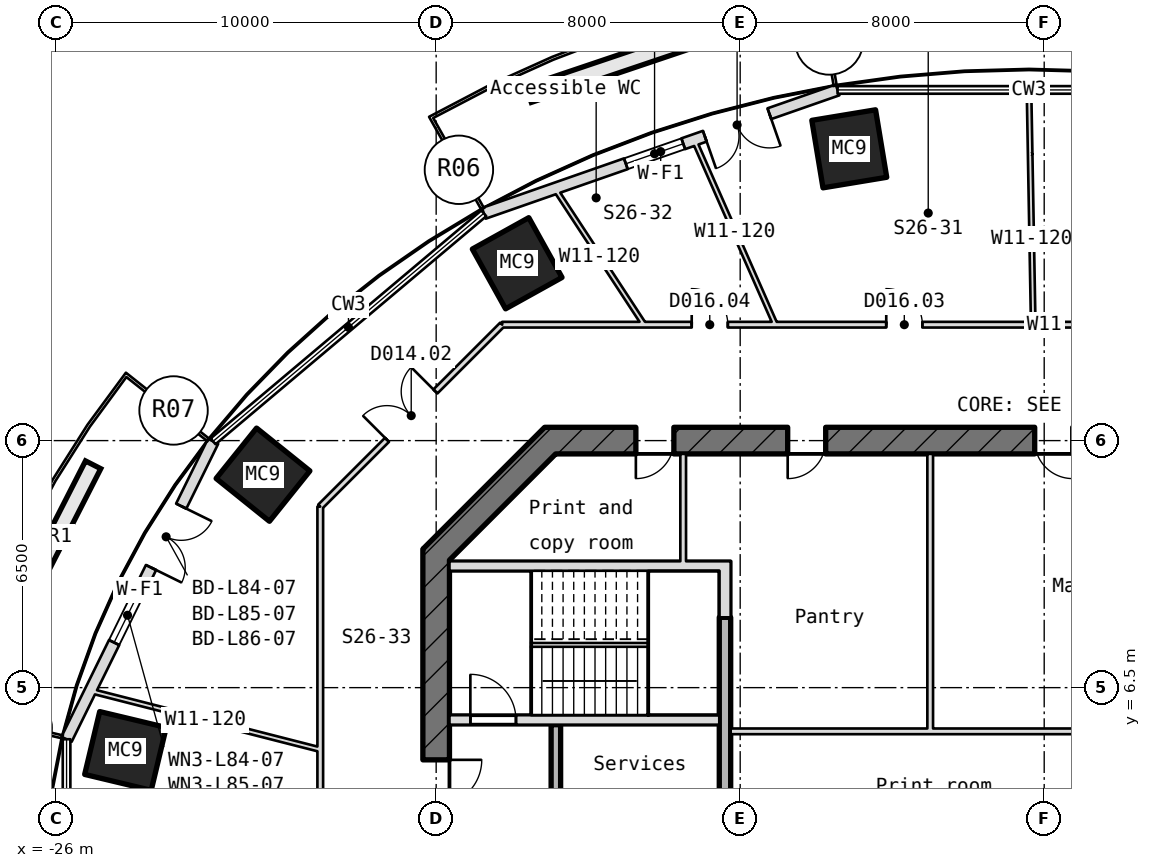
"""IFC4 building model, lengths in metres.
Left out: names, types, materials, properties, quantities, classifications, styles, units other than length and angle.
Written with IfcOpenShell. Run it as: python <this file> out.ifc"""

import sys

from ifc_helpers import new_model, si_unit, direction, frame, frame_2d, origin, origin_2d, place, context, subcontext, project, spatial, rectangle, hollow_rectangle, extrude, element, fill, save


model = new_model("IFC4")
c1 = context("Model", 3, precision=1e-05, world=origin(), true_north=direction((0.0, 1.0)))
c2 = subcontext(c1, "Body", "Model", "MODEL_VIEW")
j1 = project(units=[si_unit("LENGTHUNIT", "METRE"), si_unit("PLANEANGLEUNIT", "RADIAN")], contexts=[c1])
p1 = place(None, origin())
s1 = spatial("IfcSite", under=j1, at=p1, CompositionType="ELEMENT")
p2 = place(p1, origin())
s2 = spatial("IfcBuilding", under=s1, at=p2, CompositionType="ELEMENT")
p3 = place(p2, frame((0.0, 0.0, 371.65)))
s3 = spatial("IfcBuildingStorey", under=s2, at=p3, CompositionType="ELEMENT", Elevation=371.65)
for number, where, z_axis, x_axis in (
    (1, (-5.129, 20.677, -0.18), (0.0, 0.0, 1.0), (0.987, 0.163, 0.0)),
    (2, (-13.868, 17.667, -0.18), (0.0, 0.0, 1.0), (0.874, 0.486, 0.0)),
    (3, (-20.556, 12.103, -0.18), (0.0, 0.0, 1.0), (0.626, 0.78, 0.0)),
    (4, (-24.176, 4.834, -0.18), (0.0, 0.0, 1.0), (0.233, 0.973, 0.0)),
):
    element("IfcColumn", number, at=place(p3, frame(where, z_axis=z_axis, x_axis=x_axis)), inside=s3, PredefinedType="COLUMN", context=c2, shape_type="SweptSolid", body=[
        extrude(hollow_rectangle(XDim=1.7, YDim=1.8, WallThickness=0.05, at=origin_2d()), origin(), (0.0, 0.0, 1.0), 4.15),
    ])
p4 = place(p3, frame((-5.438, 22.227, 0.0), z_axis=(0.0, 0.0, 1.0), x_axis=(-0.944201076981, -0.329369589106, 0.0)))
e5 = element("IfcWall", 5, at=p4, inside=s3, PredefinedType="SOLIDWALL", context=c2, shape_type="SweptSolid", body=[
    extrude(rectangle(XDim=9.858, YDim=0.3, at=frame_2d((4.929, 0.0))), origin(), (0.0, 0.0, 1.0), 3.97),
])
p5 = place(p4, frame((1.9, 0.0, 0.0)))
e6 = element("IfcOpeningElement", 6, at=p5, cuts=e5, PredefinedType="OPENING", context=c2, shape_type="SweptSolid", body=[
    extrude(rectangle(XDim=1.8, YDim=2.4, at=frame_2d((0.9, 1.2))), frame((0.0, 0.16, 0.0), z_axis=(0.0, -1.0, 0.0), x_axis=(1.0, 0.0, 0.0)), (0.0, 0.0, 1.0), 0.32),
])
p6 = place(p4, frame((4.3, 0.0, 0.9)))
e7 = element("IfcOpeningElement", 7, at=p6, cuts=e5, PredefinedType="OPENING", context=c2, shape_type="SweptSolid", body=[
    extrude(rectangle(XDim=1.6, YDim=1.5, at=frame_2d((0.8, 0.75))), frame((0.0, 0.16, 0.0), z_axis=(0.0, -1.0, 0.0), x_axis=(1.0, 0.0, 0.0)), (0.0, 0.0, 1.0), 0.32),
])
p7 = place(p3, frame((-21.87, 12.981, 0.0), z_axis=(0.0, 0.0, 1.0), x_axis=(-0.441368721009, -0.897325833861, 0.0)))
e8 = element("IfcWall", 8, at=p7, inside=s3, PredefinedType="SOLIDWALL", context=c2, shape_type="SweptSolid", body=[
    extrude(rectangle(XDim=8.736, YDim=0.3, at=frame_2d((4.368, 0.0))), origin(), (0.0, 0.0, 1.0), 3.97),
])
p8 = place(p7, frame((1.9, 0.0, 0.0)))
e9 = element("IfcOpeningElement", 9, at=p8, cuts=e8, PredefinedType="OPENING", context=c2, shape_type="SweptSolid", body=[
    extrude(rectangle(XDim=1.8, YDim=2.4, at=frame_2d((0.9, 1.2))), frame((0.0, 0.16, 0.0), z_axis=(0.0, -1.0, 0.0), x_axis=(1.0, 0.0, 0.0)), (0.0, 0.0, 1.0), 0.32),
])
p9 = place(p7, frame((4.3, 0.0, 0.9)))
e10 = element("IfcOpeningElement", 10, at=p9, cuts=e8, PredefinedType="OPENING", context=c2, shape_type="SweptSolid", body=[
    extrude(rectangle(XDim=1.6, YDim=1.5, at=frame_2d((0.8, 0.75))), frame((0.0, 0.16, 0.0), z_axis=(0.0, -1.0, 0.0), x_axis=(1.0, 0.0, 0.0)), (0.0, 0.0, 1.0), 0.32),
])
p10 = place(p3, frame((13.145, 13.0, -0.18), z_axis=(0.0, 0.0, 1.0), x_axis=(-1.0, 0.0, 0.0)))
e11 = element("IfcWall", 11, at=p10, inside=s3, PredefinedType="SHEAR", context=c2, shape_type="SweptSolid", body=[
    extrude(rectangle(XDim=26.29, YDim=0.7, at=frame_2d((13.145, 0.0))), origin(), (0.0, 0.0, 1.0), 4.15),
])
p11 = place(p10, frame((22.89, 0.0, 0.18)))
e12 = element("IfcOpeningElement", 12, at=p11, cuts=e11, PredefinedType="OPENING", context=c2, shape_type="SweptSolid", body=[
    extrude(rectangle(XDim=1.0, YDim=2.1, at=frame_2d((0.5, 1.05))), frame((0.0, 0.36, 0.0), z_axis=(0.0, -1.0, 0.0), x_axis=(1.0, 0.0, 0.0)), (0.0, 0.0, 1.0), 0.72),
])
p12 = place(p10, frame((18.895, 0.0, 0.18)))
e13 = element("IfcOpeningElement", 13, at=p12, cuts=e11, PredefinedType="OPENING", context=c2, shape_type="SweptSolid", body=[
    extrude(rectangle(XDim=1.0, YDim=2.1, at=frame_2d((0.5, 1.05))), frame((0.0, 0.36, 0.0), z_axis=(0.0, -1.0, 0.0), x_axis=(1.0, 0.0, 0.0)), (0.0, 0.0, 1.0), 0.72),
])
p13 = place(p10, frame((12.395, 0.0, 0.18)))
e14 = element("IfcOpeningElement", 14, at=p13, cuts=e11, PredefinedType="OPENING", context=c2, shape_type="SweptSolid", body=[
    extrude(rectangle(XDim=1.0, YDim=2.1, at=frame_2d((0.5, 1.05))), frame((0.0, 0.36, 0.0), z_axis=(0.0, -1.0, 0.0), x_axis=(1.0, 0.0, 0.0)), (0.0, 0.0, 1.0), 0.72),
])
p14 = place(p10, frame((4.467, 0.0, 0.18)))
e15 = element("IfcOpeningElement", 15, at=p14, cuts=e11, PredefinedType="OPENING", context=c2, shape_type="SweptSolid", body=[
    extrude(rectangle(XDim=1.0, YDim=2.1, at=frame_2d((0.5, 1.05))), frame((0.0, 0.36, 0.0), z_axis=(0.0, -1.0, 0.0), x_axis=(1.0, 0.0, 0.0)), (0.0, 0.0, 1.0), 0.72),
])
p15 = place(p3, frame((-12.897, 13.103, -0.18), z_axis=(0.0, 0.0, 1.0), x_axis=(-0.707106781187, -0.707106781187, 0.0)))
e16 = element("IfcWall", 16, at=p15, inside=s3, PredefinedType="SHEAR", context=c2, shape_type="SweptSolid", body=[
    extrude(rectangle(XDim=4.533, YDim=0.7, at=frame_2d((2.266, 0.0))), origin(), (0.0, 0.0, 1.0), 4.15),
])
p16 = place(p3, frame((-16.0, 10.145, -0.18), z_axis=(0.0, 0.0, 1.0), x_axis=(0.0, -1.0, 0.0)))
e17 = element("IfcWall", 17, at=p16, inside=s3, PredefinedType="SHEAR", context=c2, shape_type="SweptSolid", body=[
    extrude(rectangle(XDim=20.29, YDim=0.7, at=frame_2d((10.145, 0.0))), origin(), (0.0, 0.0, 1.0), 4.15),
])
p17 = place(p16, frame((8.945, 0.0, 0.18)))
e18 = element("IfcOpeningElement", 18, at=p17, cuts=e17, PredefinedType="OPENING", context=c2, shape_type="SweptSolid", body=[
    extrude(rectangle(XDim=2.4, YDim=2.1, at=frame_2d((1.2, 1.05))), frame((0.0, 0.36, 0.0), z_axis=(0.0, -1.0, 0.0), x_axis=(1.0, 0.0, 0.0)), (0.0, 0.0, 1.0), 0.72),
])
p18 = place(p16, frame((5.545, 0.0, 0.18)))
e19 = element("IfcOpeningElement", 19, at=p18, cuts=e17, PredefinedType="OPENING", context=c2, shape_type="SweptSolid", body=[
    extrude(rectangle(XDim=1.2, YDim=2.1, at=frame_2d((0.6, 1.05))), frame((0.0, 0.36, 0.0), z_axis=(0.0, -1.0, 0.0), x_axis=(1.0, 0.0, 0.0)), (0.0, 0.0, 1.0), 0.72),
])
p19 = place(p3, frame((-8.25, 5.35, 0.0), z_axis=(0.0, 0.0, 1.0), x_axis=(1.0, 0.0, 0.0)))
e20 = element("IfcWall", 20, at=p19, inside=s3, PredefinedType="PARTITIONING", context=c2, shape_type="SweptSolid", body=[
    extrude(rectangle(XDim=11.05, YDim=0.15, at=frame_2d((5.525, 0.0))), origin(), (0.0, 0.0, 1.0), 3.97),
])
p20 = place(p3, frame((-15.65, 5.65, -0.18), z_axis=(0.0, 0.0, 1.0), x_axis=(1.0, 0.0, 0.0)))
e21 = element("IfcWall", 21, at=p20, inside=s3, PredefinedType="SHEAR", context=c2, shape_type="SweptSolid", body=[
    extrude(rectangle(XDim=7.1, YDim=0.25, at=frame_2d((3.55, 0.0))), origin(), (0.0, 0.0, 1.0), 4.15),
])
p21 = place(p20, frame((0.55, 0.0, 0.18)))
e22 = element("IfcOpeningElement", 22, at=p21, cuts=e21, PredefinedType="OPENING", context=c2, shape_type="SweptSolid", body=[
    extrude(rectangle(XDim=1.2, YDim=2.1, at=frame_2d((0.6, 1.05))), frame((0.0, 0.135, 0.0), z_axis=(0.0, -1.0, 0.0), x_axis=(1.0, 0.0, 0.0)), (0.0, 0.0, 1.0), 0.27),
])
p22 = place(p3, frame((-15.65, 9.7, -0.18), z_axis=(0.0, 0.0, 1.0), x_axis=(1.0, 0.0, 0.0)))
e23 = element("IfcWall", 23, at=p22, inside=s3, PredefinedType="SHEAR", context=c2, shape_type="SweptSolid", body=[
    extrude(rectangle(XDim=7.1, YDim=0.25, at=frame_2d((3.55, 0.0))), origin(), (0.0, 0.0, 1.0), 4.15),
])
p23 = place(p3, frame((-12.85, 2.475, 0.0), z_axis=(0.0, 0.0, 1.0), x_axis=(0.0, 1.0, 0.0)))
e24 = element("IfcWall", 24, at=p23, inside=s3, PredefinedType="STANDARD", context=c2, shape_type="SweptSolid", body=[
    extrude(rectangle(XDim=3.05, YDim=0.25, at=frame_2d((1.525, 0.0))), origin(), (0.0, 0.0, 1.0), 3.97),
])
p24 = place(p3, frame((-9.5, 9.825, 0.0), z_axis=(0.0, 0.0, 1.0), x_axis=(0.0, 1.0, 0.0)))
e25 = element("IfcWall", 25, at=p24, inside=s3, PredefinedType="PARTITIONING", context=c2, shape_type="SweptSolid", body=[
    extrude(rectangle(XDim=2.825, YDim=0.15, at=frame_2d((1.413, 0.0))), origin(), (0.0, 0.0, 1.0), 3.97),
])
p25 = place(p3, frame((-8.4, 2.5, -0.18), z_axis=(0.0, 0.0, 1.0), x_axis=(0.0, 1.0, 0.0)))
e26 = element("IfcWall", 26, at=p25, inside=s3, PredefinedType="SHEAR", context=c2, shape_type="SweptSolid", body=[
    extrude(rectangle(XDim=5.85, YDim=0.3, at=frame_2d((2.925, 0.0))), origin(), (0.0, 0.0, 1.0), 4.15),
])
p26 = place(p3, frame((-8.4, 8.35, -0.18), z_axis=(0.0, 0.0, 1.0), x_axis=(0.0, 1.0, 0.0)))
e27 = element("IfcWall", 27, at=p26, inside=s3, PredefinedType="SHEAR", context=c2, shape_type="SweptSolid", body=[
    extrude(rectangle(XDim=1.475, YDim=0.3, at=frame_2d((0.737, 0.0))), origin(), (0.0, 0.0, 1.0), 4.15),
])
p27 = place(p3, frame((-3.0, 5.425, 0.0), z_axis=(0.0, 0.0, 1.0), x_axis=(0.0, 1.0, 0.0)))
e28 = element("IfcWall", 28, at=p27, inside=s3, PredefinedType="PARTITIONING", context=c2, shape_type="SweptSolid", body=[
    extrude(rectangle(XDim=7.225, YDim=0.15, at=frame_2d((3.612, 0.0))), origin(), (0.0, 0.0, 1.0), 3.97),
])
p28 = place(p3, frame((-19.05, -11.263, 0.0), z_axis=(0.0, 0.0, 1.0), x_axis=(0.0, 1.0, 0.0)))
e29 = element("IfcWall", 29, at=p28, inside=s3, PredefinedType="PARTITIONING", context=c2, shape_type="SweptSolid", body=[
    extrude(rectangle(XDim=22.527, YDim=0.15, at=frame_2d((11.263, 0.0))), origin(), (0.0, 0.0, 1.0), 3.97),
])
p29 = place(p28, frame((5.065, 0.0, 0.0)))
e30 = element("IfcOpeningElement", 30, at=p29, cuts=e29, PredefinedType="OPENING", context=c2, shape_type="SweptSolid", body=[
    extrude(rectangle(XDim=1.8, YDim=2.1, at=frame_2d((0.9, 1.05))), frame((0.0, 0.085, 0.0), z_axis=(0.0, -1.0, 0.0), x_axis=(1.0, 0.0, 0.0)), (0.0, 0.0, 1.0), 0.17),
])
p30 = place(p3, frame((-19.05, 4.868, 0.0), z_axis=(0.0, 0.0, 1.0), x_axis=(-0.968871434857, 0.247564421351, 0.0)))
e31 = element("IfcWall", 31, at=p30, inside=s3, PredefinedType="PARTITIONING", context=c2, shape_type="SweptSolid", body=[
    extrude(rectangle(XDim=6.244, YDim=0.12, at=frame_2d((3.122, 0.0))), origin(), (0.0, 0.0, 1.0), 3.97),
])
p31 = place(p3, frame((-19.05, 11.263, 0.0), z_axis=(0.0, 0.0, 1.0), x_axis=(0.707106781187, 0.707106781187, 0.0)))
e32 = element("IfcWall", 32, at=p31, inside=s3, PredefinedType="PARTITIONING", context=c2, shape_type="SweptSolid", body=[
    extrude(rectangle(XDim=6.769, YDim=0.15, at=frame_2d((3.385, 0.0))), origin(), (0.0, 0.0, 1.0), 3.97),
])
p32 = place(p31, frame((2.485, 0.0, 0.0)))
e33 = element("IfcOpeningElement", 33, at=p32, cuts=e32, PredefinedType="OPENING", context=c2, shape_type="SweptSolid", body=[
    extrude(rectangle(XDim=1.8, YDim=2.1, at=frame_2d((0.9, 1.05))), frame((0.0, 0.085, 0.0), z_axis=(0.0, -1.0, 0.0), x_axis=(1.0, 0.0, 0.0)), (0.0, 0.0, 1.0), 0.17),
])
p33 = place(p3, frame((-14.263, 16.05, 0.0), z_axis=(0.0, 0.0, 1.0), x_axis=(1.0, 0.0, 0.0)))
e34 = element("IfcWall", 34, at=p33, inside=s3, PredefinedType="PARTITIONING", context=c2, shape_type="SweptSolid", body=[
    extrude(rectangle(XDim=28.527, YDim=0.15, at=frame_2d((14.263, 0.0))), origin(), (0.0, 0.0, 1.0), 3.97),
])
p34 = place(p33, frame((16.064, 0.0, 0.0)))
e35 = element("IfcOpeningElement", 35, at=p34, cuts=e34, PredefinedType="OPENING", context=c2, shape_type="SweptSolid", body=[
    extrude(rectangle(XDim=0.95, YDim=2.1, at=frame_2d((0.475, 1.05))), frame((0.0, 0.085, 0.0), z_axis=(0.0, -1.0, 0.0), x_axis=(1.0, 0.0, 0.0)), (0.0, 0.0, 1.0), 0.17),
])
p35 = place(p33, frame((10.107, 0.0, 0.0)))
e36 = element("IfcOpeningElement", 36, at=p35, cuts=e34, PredefinedType="OPENING", context=c2, shape_type="SweptSolid", body=[
    extrude(rectangle(XDim=0.95, YDim=2.1, at=frame_2d((0.475, 1.05))), frame((0.0, 0.085, 0.0), z_axis=(0.0, -1.0, 0.0), x_axis=(1.0, 0.0, 0.0)), (0.0, 0.0, 1.0), 0.17),
])
p36 = place(p33, frame((4.988, 0.0, 0.0)))
e37 = element("IfcOpeningElement", 37, at=p36, cuts=e34, PredefinedType="OPENING", context=c2, shape_type="SweptSolid", body=[
    extrude(rectangle(XDim=0.95, YDim=2.1, at=frame_2d((0.475, 1.05))), frame((0.0, 0.085, 0.0), z_axis=(0.0, -1.0, 0.0), x_axis=(1.0, 0.0, 0.0)), (0.0, 0.0, 1.0), 0.17),
])
p37 = place(p3, frame((-10.528, 16.05, 0.0), z_axis=(0.0, 0.0, 1.0), x_axis=(-0.548477171189, 0.836165529477, 0.0)))
e38 = element("IfcWall", 38, at=p37, inside=s3, PredefinedType="PARTITIONING", context=c2, shape_type="SweptSolid", body=[
    extrude(rectangle(XDim=4.284, YDim=0.12, at=frame_2d((2.142, 0.0))), origin(), (0.0, 0.0, 1.0), 3.97),
])
p38 = place(p3, frame((-7.073, 16.05, 0.0), z_axis=(0.0, 0.0, 1.0), x_axis=(-0.403253099631, 0.915088486234, 0.0)))
e39 = element("IfcWall", 39, at=p38, inside=s3, PredefinedType="PARTITIONING", context=c2, shape_type="SweptSolid", body=[
    extrude(rectangle(XDim=5.311, YDim=0.12, at=frame_2d((2.655, 0.0))), origin(), (0.0, 0.0, 1.0), 3.97),
])
p39 = place(p3, frame((-0.289, 16.05, 0.0), z_axis=(0.0, 0.0, 1.0), x_axis=(-0.01800089031, 0.999837970847, 0.0)))
e40 = element("IfcWall", 40, at=p39, inside=s3, PredefinedType="PARTITIONING", context=c2, shape_type="SweptSolid", body=[
    extrude(rectangle(XDim=4.489, YDim=0.12, at=frame_2d((2.245, 0.0))), origin(), (0.0, 0.0, 1.0), 3.617),
])
p40 = place(p3, frame((-0.37, 20.539, 0.0), z_axis=(0.0, 0.0, 1.0), x_axis=(-0.017923967001, 0.9998393528, 0.0)))
e41 = element("IfcWall", 41, at=p40, inside=s3, PredefinedType="PARTITIONING", context=c2, shape_type="SweptSolid", body=[
    extrude(rectangle(XDim=1.689, YDim=0.12, at=frame_2d((0.844, 0.0))), origin(), (0.0, 0.0, 1.0), 3.97),
])
p41 = place(p5, origin())
e42 = element("IfcDoor", 42, at=p41, inside=s3, OperationType="SINGLE_SWING_LEFT", PredefinedType="DOOR", context=c2, shape_type="SweptSolid", body=[
    extrude(rectangle(XDim=1.8, YDim=2.4, at=frame_2d((0.9, 1.2))), frame((0.0, 0.025, 0.0), z_axis=(0.0, -1.0, 0.0), x_axis=(1.0, 0.0, 0.0)), (0.0, 0.0, 1.0), 0.05),
])
fill(e6, e42)
p42 = place(p6, origin())
e43 = element("IfcWindow", 43, at=p42, inside=s3, PartitioningType="SINGLE_PANEL", PredefinedType="WINDOW", context=c2, shape_type="SweptSolid", body=[
    extrude(rectangle(XDim=1.6, YDim=1.5, at=frame_2d((0.8, 0.75))), frame((0.0, 0.03, 0.0), z_axis=(0.0, -1.0, 0.0), x_axis=(1.0, 0.0, 0.0)), (0.0, 0.0, 1.0), 0.06),
])
fill(e7, e43)
p43 = place(p8, origin())
e44 = element("IfcDoor", 44, at=p43, inside=s3, OperationType="SINGLE_SWING_LEFT", PredefinedType="DOOR", context=c2, shape_type="SweptSolid", body=[
    extrude(rectangle(XDim=1.8, YDim=2.4, at=frame_2d((0.9, 1.2))), frame((0.0, 0.025, 0.0), z_axis=(0.0, -1.0, 0.0), x_axis=(1.0, 0.0, 0.0)), (0.0, 0.0, 1.0), 0.05),
])
fill(e9, e44)
p44 = place(p9, origin())
e45 = element("IfcWindow", 45, at=p44, inside=s3, PartitioningType="SINGLE_PANEL", PredefinedType="WINDOW", context=c2, shape_type="SweptSolid", body=[
    extrude(rectangle(XDim=1.6, YDim=1.5, at=frame_2d((0.8, 0.75))), frame((0.0, 0.03, 0.0), z_axis=(0.0, -1.0, 0.0), x_axis=(1.0, 0.0, 0.0)), (0.0, 0.0, 1.0), 0.06),
])
fill(e10, e45)
p45 = place(p21, origin())
e46 = element("IfcDoor", 46, at=p45, inside=s3, OperationType="SINGLE_SWING_RIGHT", PredefinedType="DOOR", context=c2, shape_type="SweptSolid", body=[
    extrude(rectangle(XDim=1.2, YDim=2.1, at=frame_2d((0.6, 1.05))), frame((0.0, 0.025, 0.0), z_axis=(0.0, -1.0, 0.0), x_axis=(1.0, 0.0, 0.0)), (0.0, 0.0, 1.0), 0.05),
])
fill(e22, e46)
p46 = place(p18, origin())
e47 = element("IfcDoor", 47, at=p46, inside=s3, OperationType="SINGLE_SWING_RIGHT", PredefinedType="DOOR", context=c2, shape_type="SweptSolid", body=[
    extrude(rectangle(XDim=1.2, YDim=2.1, at=frame_2d((0.6, 1.05))), frame((0.0, 0.025, 0.0), z_axis=(0.0, -1.0, 0.0), x_axis=(1.0, 0.0, 0.0)), (0.0, 0.0, 1.0), 0.05),
])
fill(e19, e47)
p47 = place(p11, origin())
e48 = element("IfcDoor", 48, at=p47, inside=s3, OperationType="SINGLE_SWING_RIGHT", PredefinedType="DOOR", context=c2, shape_type="SweptSolid", body=[
    extrude(rectangle(XDim=1.0, YDim=2.1, at=frame_2d((0.5, 1.05))), frame((0.0, 0.025, 0.0), z_axis=(0.0, -1.0, 0.0), x_axis=(1.0, 0.0, 0.0)), (0.0, 0.0, 1.0), 0.05),
])
fill(e12, e48)
p48 = place(p12, origin())
e49 = element("IfcDoor", 49, at=p48, inside=s3, OperationType="SINGLE_SWING_RIGHT", PredefinedType="DOOR", context=c2, shape_type="SweptSolid", body=[
    extrude(rectangle(XDim=1.0, YDim=2.1, at=frame_2d((0.5, 1.05))), frame((0.0, 0.025, 0.0), z_axis=(0.0, -1.0, 0.0), x_axis=(1.0, 0.0, 0.0)), (0.0, 0.0, 1.0), 0.05),
])
fill(e13, e49)
p49 = place(p13, origin())
e50 = element("IfcDoor", 50, at=p49, inside=s3, OperationType="SINGLE_SWING_RIGHT", PredefinedType="DOOR", context=c2, shape_type="SweptSolid", body=[
    extrude(rectangle(XDim=1.0, YDim=2.1, at=frame_2d((0.5, 1.05))), frame((0.0, 0.025, 0.0), z_axis=(0.0, -1.0, 0.0), x_axis=(1.0, 0.0, 0.0)), (0.0, 0.0, 1.0), 0.05),
])
fill(e14, e50)
p50 = place(p35, origin())
e51 = element("IfcDoor", 51, at=p50, inside=s3, OperationType="SINGLE_SWING_RIGHT", PredefinedType="DOOR", context=c2, shape_type="SweptSolid", body=[
    extrude(rectangle(XDim=0.95, YDim=2.1, at=frame_2d((0.475, 1.05))), frame((0.0, 0.025, 0.0), z_axis=(0.0, -1.0, 0.0), x_axis=(1.0, 0.0, 0.0)), (0.0, 0.0, 1.0), 0.05),
])
fill(e36, e51)
p51 = place(p36, origin())
e52 = element("IfcDoor", 52, at=p51, inside=s3, OperationType="SINGLE_SWING_RIGHT", PredefinedType="DOOR", context=c2, shape_type="SweptSolid", body=[
    extrude(rectangle(XDim=0.95, YDim=2.1, at=frame_2d((0.475, 1.05))), frame((0.0, 0.025, 0.0), z_axis=(0.0, -1.0, 0.0), x_axis=(1.0, 0.0, 0.0)), (0.0, 0.0, 1.0), 0.05),
])
fill(e37, e52)
p52 = place(p32, origin())
e53 = element("IfcDoor", 53, at=p52, inside=s3, OperationType="DOUBLE_DOOR_SINGLE_SWING", PredefinedType="DOOR", context=c2, shape_type="SweptSolid", body=[
    extrude(rectangle(XDim=1.8, YDim=2.1, at=frame_2d((0.9, 1.05))), frame((0.0, 0.025, 0.0), z_axis=(0.0, -1.0, 0.0), x_axis=(1.0, 0.0, 0.0)), (0.0, 0.0, 1.0), 0.05),
])
fill(e33, e53)
save(model, sys.argv[1])
